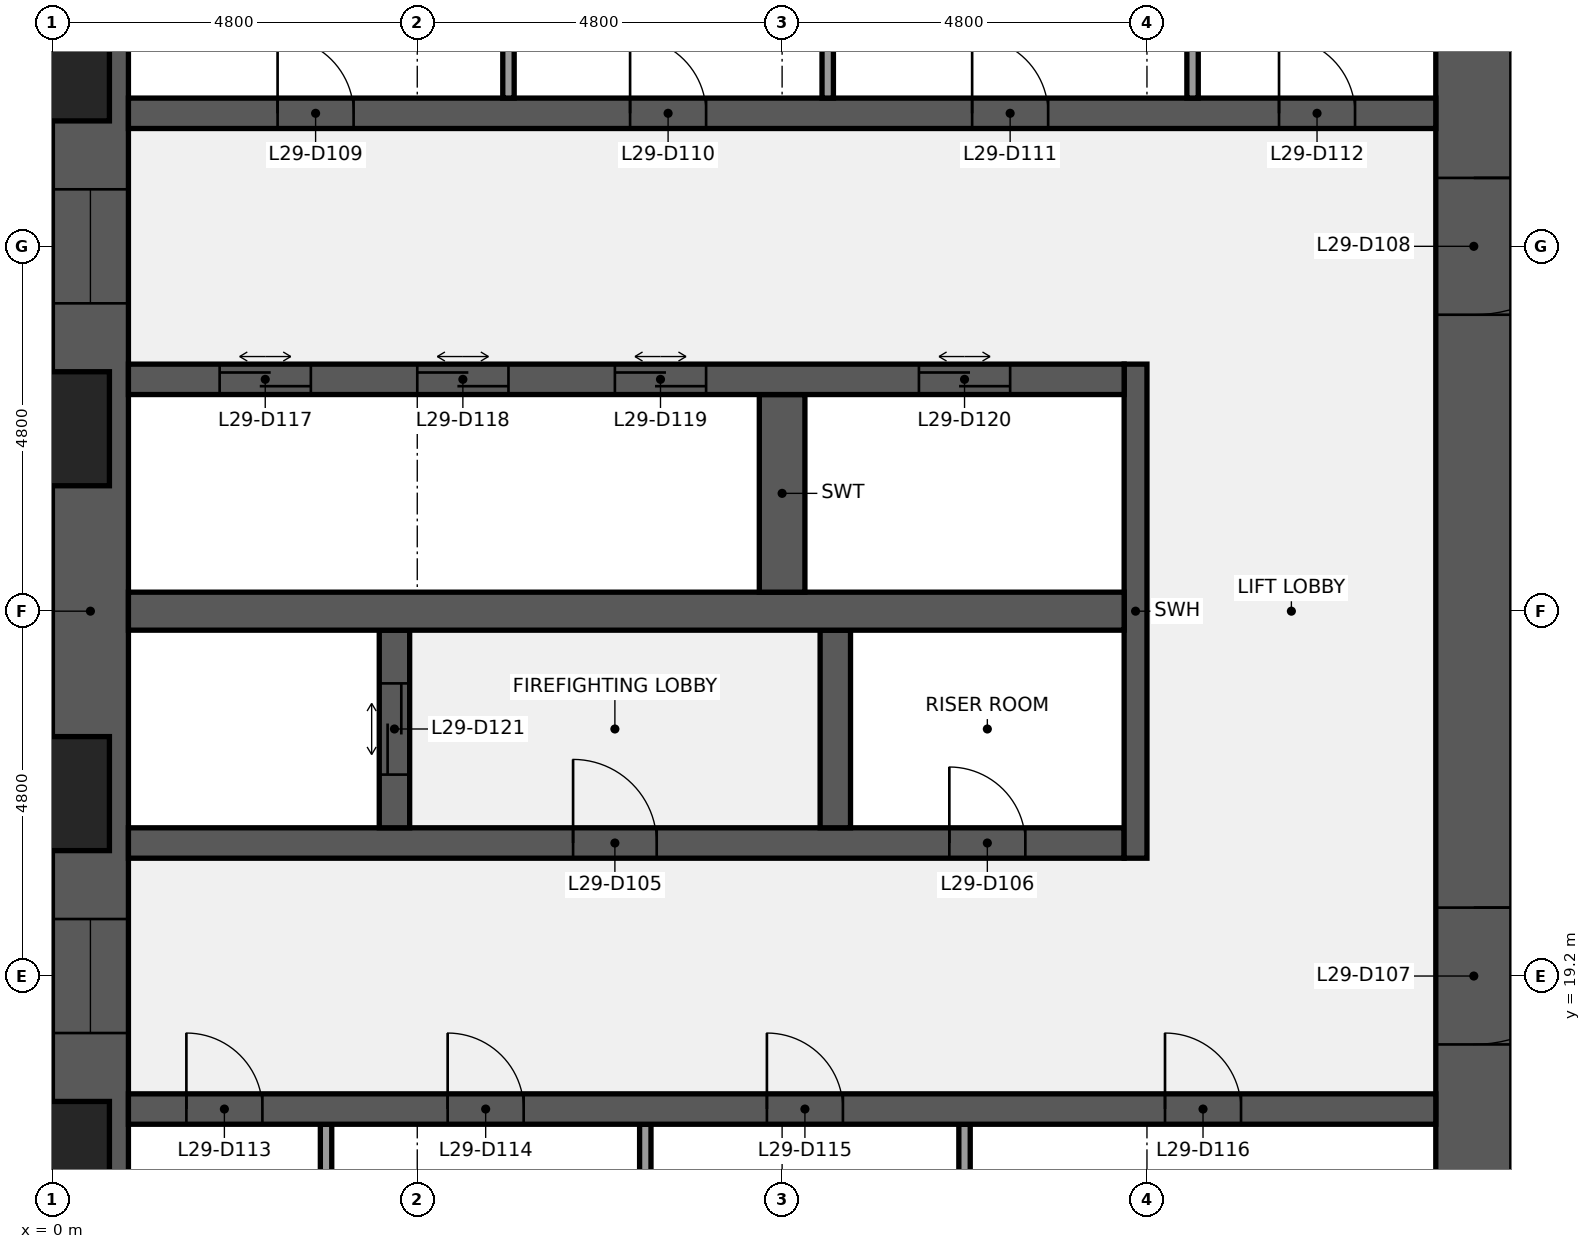
"""IFC4 building model, lengths in metres.
Left out: names, types, materials, properties, quantities, classifications, styles, units other than length and angle.
Written with IfcOpenShell. Run it as: python <this file> out.ifc"""

import sys

from ifc_helpers import new_model, si_unit, direction, frame, frame_2d, origin, place, context, subcontext, project, spatial, rectangle, extrude, element, fill, save


model = new_model("IFC4")
c1 = context("Model", 3, precision=1e-05, world=origin(), true_north=direction((0.0, 1.0)))
c2 = subcontext(c1, "Body", "Model", "MODEL_VIEW")
j1 = project(units=[si_unit("LENGTHUNIT", "METRE"), si_unit("PLANEANGLEUNIT", "RADIAN")], contexts=[c1])
p1 = place(None, origin())
s1 = spatial("IfcSite", under=j1, at=p1, CompositionType="ELEMENT")
p2 = place(p1, origin())
s2 = spatial("IfcBuilding", under=s1, at=p2, CompositionType="ELEMENT")
p3 = place(p2, frame((0.0, 0.0, 136.1)))
s3 = spatial("IfcBuildingStorey", under=s2, at=p3, CompositionType="ELEMENT", Elevation=136.1)
p4 = place(p3, frame((0.5, 9.6, 0.0), z_axis=(0.0, 0.0, 1.0), x_axis=(0.0, 1.0, 0.0)))
e1 = element("IfcWall", 1, at=p4, inside=s3, PredefinedType="SHEAR", context=c2, shape_type="SweptSolid", body=[
    extrude(rectangle(XDim=28.8, YDim=1.0, at=frame_2d((14.4, 0.0))), origin(), (0.0, 0.0, 1.0), 3.84),
])
p5 = place(p4, frame((8.85, 0.0, 0.9)))
e2 = element("IfcOpeningElement", 2, at=p5, cuts=e1, PredefinedType="OPENING", context=c2, shape_type="SweptSolid", body=[
    extrude(rectangle(XDim=1.5, YDim=1.5, at=frame_2d((0.75, 0.75))), frame((0.0, 0.51, 0.0), z_axis=(0.0, -1.0, 0.0), x_axis=(1.0, 0.0, 0.0)), (0.0, 0.0, 1.0), 1.02),
])
p6 = place(p4, frame((18.45, 0.0, 0.9)))
e3 = element("IfcOpeningElement", 3, at=p6, cuts=e1, PredefinedType="OPENING", context=c2, shape_type="SweptSolid", body=[
    extrude(rectangle(XDim=1.5, YDim=1.5, at=frame_2d((0.75, 0.75))), frame((0.0, 0.51, 0.0), z_axis=(0.0, -1.0, 0.0), x_axis=(1.0, 0.0, 0.0)), (0.0, 0.0, 1.0), 1.02),
])
p7 = place(p3, frame((18.7, 38.4, 0.0), z_axis=(0.0, 0.0, 1.0), x_axis=(0.0, -1.0, 0.0)))
e4 = element("IfcWall", 4, at=p7, inside=s3, PredefinedType="SHEAR", context=c2, shape_type="SweptSolid", body=[
    extrude(rectangle(XDim=28.8, YDim=1.0, at=frame_2d((14.4, 0.0))), origin(), (0.0, 0.0, 1.0), 3.84),
])
p8 = place(p7, frame((18.3, 0.0, 0.0)))
e5 = element("IfcOpeningElement", 5, at=p8, cuts=e4, PredefinedType="OPENING", context=c2, shape_type="SweptSolid", body=[
    extrude(rectangle(XDim=1.8, YDim=2.1, at=frame_2d((0.9, 1.05))), frame((0.0, 0.51, 0.0), z_axis=(0.0, -1.0, 0.0), x_axis=(1.0, 0.0, 0.0)), (0.0, 0.0, 1.0), 1.02),
])
p9 = place(p7, frame((8.7, 0.0, 0.0)))
e6 = element("IfcOpeningElement", 6, at=p9, cuts=e4, PredefinedType="OPENING", context=c2, shape_type="SweptSolid", body=[
    extrude(rectangle(XDim=1.8, YDim=2.1, at=frame_2d((0.9, 1.05))), frame((0.0, 0.51, 0.0), z_axis=(0.0, -1.0, 0.0), x_axis=(1.0, 0.0, 0.0)), (0.0, 0.0, 1.0), 1.02),
])
for number, where, z_axis, x_axis in (
    (7, (3.6, 14.65, 0.0), (0.0, 0.0, 1.0), (0.0, 1.0, 0.0)),
    (8, (7.8, 14.65, 0.0), (0.0, 0.0, 1.0), (0.0, 1.0, 0.0)),
    (9, (12.0, 14.65, 0.0), (0.0, 0.0, 1.0), (0.0, 1.0, 0.0)),
):
    element("IfcWall", number, at=place(p3, frame(where, z_axis=z_axis, x_axis=x_axis)), inside=s3, PredefinedType="PARTITIONING", context=c2, shape_type="SweptSolid", body=[
        extrude(rectangle(XDim=2.6, YDim=0.15, at=frame_2d((1.3, 0.0))), origin(), (0.0, 0.0, 1.0), 3.84),
    ])
p10 = place(p3, frame((1.0, 17.45, 0.0), z_axis=(0.0, 0.0, 1.0), x_axis=(1.0, 0.0, 0.0)))
e10 = element("IfcWall", 10, at=p10, inside=s3, PredefinedType="SHEAR", context=c2, shape_type="SweptSolid", body=[
    extrude(rectangle(XDim=17.2, YDim=0.4, at=frame_2d((8.6, 0.0))), origin(), (0.0, 0.0, 1.0), 3.84),
])
p11 = place(p10, frame((0.762, 0.0, 0.0)))
e11 = element("IfcOpeningElement", 11, at=p11, cuts=e10, PredefinedType="OPENING", context=c2, shape_type="SweptSolid", body=[
    extrude(rectangle(XDim=1.0, YDim=2.1, at=frame_2d((0.5, 1.05))), frame((0.0, 0.21, 0.0), z_axis=(0.0, -1.0, 0.0), x_axis=(1.0, 0.0, 0.0)), (0.0, 0.0, 1.0), 0.42),
])
p12 = place(p10, frame((4.2, 0.0, 0.0)))
e12 = element("IfcOpeningElement", 12, at=p12, cuts=e10, PredefinedType="OPENING", context=c2, shape_type="SweptSolid", body=[
    extrude(rectangle(XDim=1.0, YDim=2.1, at=frame_2d((0.5, 1.05))), frame((0.0, 0.21, 0.0), z_axis=(0.0, -1.0, 0.0), x_axis=(1.0, 0.0, 0.0)), (0.0, 0.0, 1.0), 0.42),
])
p13 = place(p10, frame((8.4, 0.0, 0.0)))
e13 = element("IfcOpeningElement", 13, at=p13, cuts=e10, PredefinedType="OPENING", context=c2, shape_type="SweptSolid", body=[
    extrude(rectangle(XDim=1.0, YDim=2.1, at=frame_2d((0.5, 1.05))), frame((0.0, 0.21, 0.0), z_axis=(0.0, -1.0, 0.0), x_axis=(1.0, 0.0, 0.0)), (0.0, 0.0, 1.0), 0.42),
])
p14 = place(p10, frame((13.637, 0.0, 0.0)))
e14 = element("IfcOpeningElement", 14, at=p14, cuts=e10, PredefinedType="OPENING", context=c2, shape_type="SweptSolid", body=[
    extrude(rectangle(XDim=1.0, YDim=2.1, at=frame_2d((0.5, 1.05))), frame((0.0, 0.21, 0.0), z_axis=(0.0, -1.0, 0.0), x_axis=(1.0, 0.0, 0.0)), (0.0, 0.0, 1.0), 0.42),
])
p15 = place(p3, frame((1.0, 20.95, 0.0), z_axis=(0.0, 0.0, 1.0), x_axis=(1.0, 0.0, 0.0)))
e15 = element("IfcWall", 15, at=p15, inside=s3, PredefinedType="SHEAR", context=c2, shape_type="SweptSolid", body=[
    extrude(rectangle(XDim=13.1, YDim=0.4, at=frame_2d((6.55, 0.0))), origin(), (0.0, 0.0, 1.0), 3.84),
])
p16 = place(p15, frame((5.85, 0.0, 0.0)))
e16 = element("IfcOpeningElement", 16, at=p16, cuts=e15, PredefinedType="OPENING", context=c2, shape_type="SweptSolid", body=[
    extrude(rectangle(XDim=1.1, YDim=2.1, at=frame_2d((0.55, 1.05))), frame((0.0, 0.21, 0.0), z_axis=(0.0, -1.0, 0.0), x_axis=(1.0, 0.0, 0.0)), (0.0, 0.0, 1.0), 0.42),
])
p17 = place(p15, frame((10.8, 0.0, 0.0)))
e17 = element("IfcOpeningElement", 17, at=p17, cuts=e15, PredefinedType="OPENING", context=c2, shape_type="SweptSolid", body=[
    extrude(rectangle(XDim=1.0, YDim=2.1, at=frame_2d((0.5, 1.05))), frame((0.0, 0.21, 0.0), z_axis=(0.0, -1.0, 0.0), x_axis=(1.0, 0.0, 0.0)), (0.0, 0.0, 1.0), 0.42),
])
p18 = place(p3, frame((14.25, 20.75, 0.0), z_axis=(0.0, 0.0, 1.0), x_axis=(0.0, 1.0, 0.0)))
e18 = element("IfcWall", 18, at=p18, inside=s3, PredefinedType="SHEAR", context=c2, shape_type="SweptSolid", body=[
    extrude(rectangle(XDim=6.5, YDim=0.3, at=frame_2d((3.25, 0.0))), origin(), (0.0, 0.0, 1.0), 3.84),
])
p19 = place(p3, frame((4.5, 21.15, 0.0), z_axis=(0.0, 0.0, 1.0), x_axis=(0.0, 1.0, 0.0)))
e19 = element("IfcWall", 19, at=p19, inside=s3, PredefinedType="SHEAR", context=c2, shape_type="SweptSolid", body=[
    extrude(rectangle(XDim=2.6, YDim=0.4, at=frame_2d((1.3, 0.0))), origin(), (0.0, 0.0, 1.0), 3.84),
])
p20 = place(p19, frame((0.7, 0.0, 0.0)))
e20 = element("IfcOpeningElement", 20, at=p20, cuts=e19, PredefinedType="OPENING", context=c2, shape_type="SweptSolid", body=[
    extrude(rectangle(XDim=1.2, YDim=2.1, at=frame_2d((0.6, 1.05))), frame((0.0, 0.21, 0.0), z_axis=(0.0, -1.0, 0.0), x_axis=(1.0, 0.0, 0.0)), (0.0, 0.0, 1.0), 0.42),
])
p21 = place(p3, frame((10.3, 21.15, 0.0), z_axis=(0.0, 0.0, 1.0), x_axis=(0.0, 1.0, 0.0)))
e21 = element("IfcWall", 21, at=p21, inside=s3, PredefinedType="SHEAR", context=c2, shape_type="SweptSolid", body=[
    extrude(rectangle(XDim=2.6, YDim=0.4, at=frame_2d((1.3, 0.0))), origin(), (0.0, 0.0, 1.0), 3.84),
])
p22 = place(p3, frame((1.0, 24.0, 0.0), z_axis=(0.0, 0.0, 1.0), x_axis=(1.0, 0.0, 0.0)))
e22 = element("IfcWall", 22, at=p22, inside=s3, PredefinedType="SHEAR", context=c2, shape_type="SweptSolid", body=[
    extrude(rectangle(XDim=13.1, YDim=0.5, at=frame_2d((6.55, 0.0))), origin(), (0.0, 0.0, 1.0), 3.84),
])
p23 = place(p3, frame((9.6, 24.25, 0.0), z_axis=(0.0, 0.0, 1.0), x_axis=(0.0, 1.0, 0.0)))
e23 = element("IfcWall", 23, at=p23, inside=s3, PredefinedType="SHEAR", context=c2, shape_type="SweptSolid", body=[
    extrude(rectangle(XDim=2.6, YDim=0.6, at=frame_2d((1.3, 0.0))), origin(), (0.0, 0.0, 1.0), 3.84),
])
p24 = place(p3, frame((1.0, 27.05, 0.0), z_axis=(0.0, 0.0, 1.0), x_axis=(1.0, 0.0, 0.0)))
e24 = element("IfcWall", 24, at=p24, inside=s3, PredefinedType="SHEAR", context=c2, shape_type="SweptSolid", body=[
    extrude(rectangle(XDim=13.1, YDim=0.4, at=frame_2d((6.55, 0.0))), origin(), (0.0, 0.0, 1.0), 3.84),
])
p25 = place(p24, frame((1.2, 0.0, 0.0)))
e25 = element("IfcOpeningElement", 25, at=p25, cuts=e24, PredefinedType="OPENING", context=c2, shape_type="SweptSolid", body=[
    extrude(rectangle(XDim=1.2, YDim=2.1, at=frame_2d((0.6, 1.05))), frame((0.0, 0.21, 0.0), z_axis=(0.0, -1.0, 0.0), x_axis=(1.0, 0.0, 0.0)), (0.0, 0.0, 1.0), 0.42),
])
p26 = place(p24, frame((3.8, 0.0, 0.0)))
e26 = element("IfcOpeningElement", 26, at=p26, cuts=e24, PredefinedType="OPENING", context=c2, shape_type="SweptSolid", body=[
    extrude(rectangle(XDim=1.2, YDim=2.1, at=frame_2d((0.6, 1.05))), frame((0.0, 0.21, 0.0), z_axis=(0.0, -1.0, 0.0), x_axis=(1.0, 0.0, 0.0)), (0.0, 0.0, 1.0), 0.42),
])
p27 = place(p24, frame((6.4, 0.0, 0.0)))
e27 = element("IfcOpeningElement", 27, at=p27, cuts=e24, PredefinedType="OPENING", context=c2, shape_type="SweptSolid", body=[
    extrude(rectangle(XDim=1.2, YDim=2.1, at=frame_2d((0.6, 1.05))), frame((0.0, 0.21, 0.0), z_axis=(0.0, -1.0, 0.0), x_axis=(1.0, 0.0, 0.0)), (0.0, 0.0, 1.0), 0.42),
])
p28 = place(p24, frame((10.4, 0.0, 0.0)))
e28 = element("IfcOpeningElement", 28, at=p28, cuts=e24, PredefinedType="OPENING", context=c2, shape_type="SweptSolid", body=[
    extrude(rectangle(XDim=1.2, YDim=2.1, at=frame_2d((0.6, 1.05))), frame((0.0, 0.21, 0.0), z_axis=(0.0, -1.0, 0.0), x_axis=(1.0, 0.0, 0.0)), (0.0, 0.0, 1.0), 0.42),
])
p29 = place(p3, frame((1.0, 30.55, 0.0), z_axis=(0.0, 0.0, 1.0), x_axis=(1.0, 0.0, 0.0)))
e29 = element("IfcWall", 29, at=p29, inside=s3, PredefinedType="SHEAR", context=c2, shape_type="SweptSolid", body=[
    extrude(rectangle(XDim=17.2, YDim=0.4, at=frame_2d((8.6, 0.0))), origin(), (0.0, 0.0, 1.0), 3.84),
])
p30 = place(p29, frame((1.962, 0.0, 0.0)))
e30 = element("IfcOpeningElement", 30, at=p30, cuts=e29, PredefinedType="OPENING", context=c2, shape_type="SweptSolid", body=[
    extrude(rectangle(XDim=1.0, YDim=2.1, at=frame_2d((0.5, 1.05))), frame((0.0, 0.21, 0.0), z_axis=(0.0, -1.0, 0.0), x_axis=(1.0, 0.0, 0.0)), (0.0, 0.0, 1.0), 0.42),
])
p31 = place(p29, frame((6.6, 0.0, 0.0)))
e31 = element("IfcOpeningElement", 31, at=p31, cuts=e29, PredefinedType="OPENING", context=c2, shape_type="SweptSolid", body=[
    extrude(rectangle(XDim=1.0, YDim=2.1, at=frame_2d((0.5, 1.05))), frame((0.0, 0.21, 0.0), z_axis=(0.0, -1.0, 0.0), x_axis=(1.0, 0.0, 0.0)), (0.0, 0.0, 1.0), 0.42),
])
p32 = place(p29, frame((11.1, 0.0, 0.0)))
e32 = element("IfcOpeningElement", 32, at=p32, cuts=e29, PredefinedType="OPENING", context=c2, shape_type="SweptSolid", body=[
    extrude(rectangle(XDim=1.0, YDim=2.1, at=frame_2d((0.5, 1.05))), frame((0.0, 0.21, 0.0), z_axis=(0.0, -1.0, 0.0), x_axis=(1.0, 0.0, 0.0)), (0.0, 0.0, 1.0), 0.42),
])
p33 = place(p29, frame((15.137, 0.0, 0.0)))
e33 = element("IfcOpeningElement", 33, at=p33, cuts=e29, PredefinedType="OPENING", context=c2, shape_type="SweptSolid", body=[
    extrude(rectangle(XDim=1.0, YDim=2.1, at=frame_2d((0.5, 1.05))), frame((0.0, 0.21, 0.0), z_axis=(0.0, -1.0, 0.0), x_axis=(1.0, 0.0, 0.0)), (0.0, 0.0, 1.0), 0.42),
])
for number, where, z_axis, x_axis in (
    (34, (6.0, 30.75, 0.0), (0.0, 0.0, 1.0), (0.0, 1.0, 0.0)),
    (35, (10.2, 30.75, 0.0), (0.0, 0.0, 1.0), (0.0, 1.0, 0.0)),
    (36, (15.0, 30.75, 0.0), (0.0, 0.0, 1.0), (0.0, 1.0, 0.0)),
):
    element("IfcWall", number, at=place(p3, frame(where, z_axis=z_axis, x_axis=x_axis)), inside=s3, PredefinedType="PARTITIONING", context=c2, shape_type="SweptSolid", body=[
        extrude(rectangle(XDim=2.6, YDim=0.15, at=frame_2d((1.3, 0.0))), origin(), (0.0, 0.0, 1.0), 3.84),
    ])
p34 = place(p16, origin())
e37 = element("IfcDoor", 37, at=p34, inside=s3, OperationType="SINGLE_SWING_LEFT", PredefinedType="DOOR", context=c2, shape_type="SweptSolid", body=[
    extrude(rectangle(XDim=1.1, YDim=2.1, at=frame_2d((0.55, 1.05))), frame((0.0, 0.025, 0.0), z_axis=(0.0, -1.0, 0.0), x_axis=(1.0, 0.0, 0.0)), (0.0, 0.0, 1.0), 0.05),
])
fill(e16, e37)
p35 = place(p17, origin())
e38 = element("IfcDoor", 38, at=p35, inside=s3, OperationType="SINGLE_SWING_LEFT", PredefinedType="DOOR", context=c2, shape_type="SweptSolid", body=[
    extrude(rectangle(XDim=1.0, YDim=2.1, at=frame_2d((0.5, 1.05))), frame((0.0, 0.025, 0.0), z_axis=(0.0, -1.0, 0.0), x_axis=(1.0, 0.0, 0.0)), (0.0, 0.0, 1.0), 0.05),
])
fill(e17, e38)
p36 = place(p8, origin())
e39 = element("IfcDoor", 39, at=p36, inside=s3, OperationType="DOUBLE_DOOR_SINGLE_SWING", PredefinedType="DOOR", context=c2, shape_type="SweptSolid", body=[
    extrude(rectangle(XDim=1.8, YDim=2.1, at=frame_2d((0.9, 1.05))), frame((0.0, 0.025, 0.0), z_axis=(0.0, -1.0, 0.0), x_axis=(1.0, 0.0, 0.0)), (0.0, 0.0, 1.0), 0.05),
])
fill(e5, e39)
p37 = place(p9, origin())
e40 = element("IfcDoor", 40, at=p37, inside=s3, OperationType="DOUBLE_DOOR_SINGLE_SWING", PredefinedType="DOOR", context=c2, shape_type="SweptSolid", body=[
    extrude(rectangle(XDim=1.8, YDim=2.1, at=frame_2d((0.9, 1.05))), frame((0.0, 0.025, 0.0), z_axis=(0.0, -1.0, 0.0), x_axis=(1.0, 0.0, 0.0)), (0.0, 0.0, 1.0), 0.05),
])
fill(e6, e40)
p38 = place(p30, origin())
e41 = element("IfcDoor", 41, at=p38, inside=s3, OperationType="SINGLE_SWING_LEFT", PredefinedType="DOOR", context=c2, shape_type="SweptSolid", body=[
    extrude(rectangle(XDim=1.0, YDim=2.1, at=frame_2d((0.5, 1.05))), frame((0.0, 0.025, 0.0), z_axis=(0.0, -1.0, 0.0), x_axis=(1.0, 0.0, 0.0)), (0.0, 0.0, 1.0), 0.05),
])
fill(e30, e41)
p39 = place(p31, origin())
e42 = element("IfcDoor", 42, at=p39, inside=s3, OperationType="SINGLE_SWING_LEFT", PredefinedType="DOOR", context=c2, shape_type="SweptSolid", body=[
    extrude(rectangle(XDim=1.0, YDim=2.1, at=frame_2d((0.5, 1.05))), frame((0.0, 0.025, 0.0), z_axis=(0.0, -1.0, 0.0), x_axis=(1.0, 0.0, 0.0)), (0.0, 0.0, 1.0), 0.05),
])
fill(e31, e42)
p40 = place(p32, origin())
e43 = element("IfcDoor", 43, at=p40, inside=s3, OperationType="SINGLE_SWING_LEFT", PredefinedType="DOOR", context=c2, shape_type="SweptSolid", body=[
    extrude(rectangle(XDim=1.0, YDim=2.1, at=frame_2d((0.5, 1.05))), frame((0.0, 0.025, 0.0), z_axis=(0.0, -1.0, 0.0), x_axis=(1.0, 0.0, 0.0)), (0.0, 0.0, 1.0), 0.05),
])
fill(e32, e43)
p41 = place(p33, origin())
e44 = element("IfcDoor", 44, at=p41, inside=s3, OperationType="SINGLE_SWING_LEFT", PredefinedType="DOOR", context=c2, shape_type="SweptSolid", body=[
    extrude(rectangle(XDim=1.0, YDim=2.1, at=frame_2d((0.5, 1.05))), frame((0.0, 0.025, 0.0), z_axis=(0.0, -1.0, 0.0), x_axis=(1.0, 0.0, 0.0)), (0.0, 0.0, 1.0), 0.05),
])
fill(e33, e44)
p42 = place(p11, origin())
e45 = element("IfcDoor", 45, at=p42, inside=s3, OperationType="SINGLE_SWING_LEFT", PredefinedType="DOOR", context=c2, shape_type="SweptSolid", body=[
    extrude(rectangle(XDim=1.0, YDim=2.1, at=frame_2d((0.5, 1.05))), frame((0.0, 0.025, 0.0), z_axis=(0.0, -1.0, 0.0), x_axis=(1.0, 0.0, 0.0)), (0.0, 0.0, 1.0), 0.05),
])
fill(e11, e45)
p43 = place(p12, origin())
e46 = element("IfcDoor", 46, at=p43, inside=s3, OperationType="SINGLE_SWING_LEFT", PredefinedType="DOOR", context=c2, shape_type="SweptSolid", body=[
    extrude(rectangle(XDim=1.0, YDim=2.1, at=frame_2d((0.5, 1.05))), frame((0.0, 0.025, 0.0), z_axis=(0.0, -1.0, 0.0), x_axis=(1.0, 0.0, 0.0)), (0.0, 0.0, 1.0), 0.05),
])
fill(e12, e46)
p44 = place(p13, origin())
e47 = element("IfcDoor", 47, at=p44, inside=s3, OperationType="SINGLE_SWING_LEFT", PredefinedType="DOOR", context=c2, shape_type="SweptSolid", body=[
    extrude(rectangle(XDim=1.0, YDim=2.1, at=frame_2d((0.5, 1.05))), frame((0.0, 0.025, 0.0), z_axis=(0.0, -1.0, 0.0), x_axis=(1.0, 0.0, 0.0)), (0.0, 0.0, 1.0), 0.05),
])
fill(e13, e47)
p45 = place(p14, origin())
e48 = element("IfcDoor", 48, at=p45, inside=s3, OperationType="SINGLE_SWING_LEFT", PredefinedType="DOOR", context=c2, shape_type="SweptSolid", body=[
    extrude(rectangle(XDim=1.0, YDim=2.1, at=frame_2d((0.5, 1.05))), frame((0.0, 0.025, 0.0), z_axis=(0.0, -1.0, 0.0), x_axis=(1.0, 0.0, 0.0)), (0.0, 0.0, 1.0), 0.05),
])
fill(e14, e48)
p46 = place(p25, origin())
e49 = element("IfcDoor", 49, at=p46, inside=s3, OperationType="DOUBLE_DOOR_SLIDING", PredefinedType="DOOR", context=c2, shape_type="SweptSolid", body=[
    extrude(rectangle(XDim=1.2, YDim=2.1, at=frame_2d((0.6, 1.05))), frame((0.0, 0.025, 0.0), z_axis=(0.0, -1.0, 0.0), x_axis=(1.0, 0.0, 0.0)), (0.0, 0.0, 1.0), 0.05),
])
fill(e25, e49)
p47 = place(p26, origin())
e50 = element("IfcDoor", 50, at=p47, inside=s3, OperationType="DOUBLE_DOOR_SLIDING", PredefinedType="DOOR", context=c2, shape_type="SweptSolid", body=[
    extrude(rectangle(XDim=1.2, YDim=2.1, at=frame_2d((0.6, 1.05))), frame((0.0, 0.025, 0.0), z_axis=(0.0, -1.0, 0.0), x_axis=(1.0, 0.0, 0.0)), (0.0, 0.0, 1.0), 0.05),
])
fill(e26, e50)
p48 = place(p27, origin())
e51 = element("IfcDoor", 51, at=p48, inside=s3, OperationType="DOUBLE_DOOR_SLIDING", PredefinedType="DOOR", context=c2, shape_type="SweptSolid", body=[
    extrude(rectangle(XDim=1.2, YDim=2.1, at=frame_2d((0.6, 1.05))), frame((0.0, 0.025, 0.0), z_axis=(0.0, -1.0, 0.0), x_axis=(1.0, 0.0, 0.0)), (0.0, 0.0, 1.0), 0.05),
])
fill(e27, e51)
p49 = place(p28, origin())
e52 = element("IfcDoor", 52, at=p49, inside=s3, OperationType="DOUBLE_DOOR_SLIDING", PredefinedType="DOOR", context=c2, shape_type="SweptSolid", body=[
    extrude(rectangle(XDim=1.2, YDim=2.1, at=frame_2d((0.6, 1.05))), frame((0.0, 0.025, 0.0), z_axis=(0.0, -1.0, 0.0), x_axis=(1.0, 0.0, 0.0)), (0.0, 0.0, 1.0), 0.05),
])
fill(e28, e52)
p50 = place(p20, origin())
e53 = element("IfcDoor", 53, at=p50, inside=s3, OperationType="DOUBLE_DOOR_SLIDING", PredefinedType="DOOR", context=c2, shape_type="SweptSolid", body=[
    extrude(rectangle(XDim=1.2, YDim=2.1, at=frame_2d((0.6, 1.05))), frame((0.0, 0.025, 0.0), z_axis=(0.0, -1.0, 0.0), x_axis=(1.0, 0.0, 0.0)), (0.0, 0.0, 1.0), 0.05),
])
fill(e20, e53)
p51 = place(p5, origin())
e54 = element("IfcWindow", 54, at=p51, inside=s3, PartitioningType="SINGLE_PANEL", PredefinedType="WINDOW", context=c2, shape_type="SweptSolid", body=[
    extrude(rectangle(XDim=1.5, YDim=1.5, at=frame_2d((0.75, 0.75))), frame((0.0, 0.03, 0.0), z_axis=(0.0, -1.0, 0.0), x_axis=(1.0, 0.0, 0.0)), (0.0, 0.0, 1.0), 0.06),
])
fill(e2, e54)
p52 = place(p6, origin())
e55 = element("IfcWindow", 55, at=p52, inside=s3, PartitioningType="SINGLE_PANEL", PredefinedType="WINDOW", context=c2, shape_type="SweptSolid", body=[
    extrude(rectangle(XDim=1.5, YDim=1.5, at=frame_2d((0.75, 0.75))), frame((0.0, 0.03, 0.0), z_axis=(0.0, -1.0, 0.0), x_axis=(1.0, 0.0, 0.0)), (0.0, 0.0, 1.0), 0.06),
])
fill(e3, e55)
save(model, sys.argv[1])
